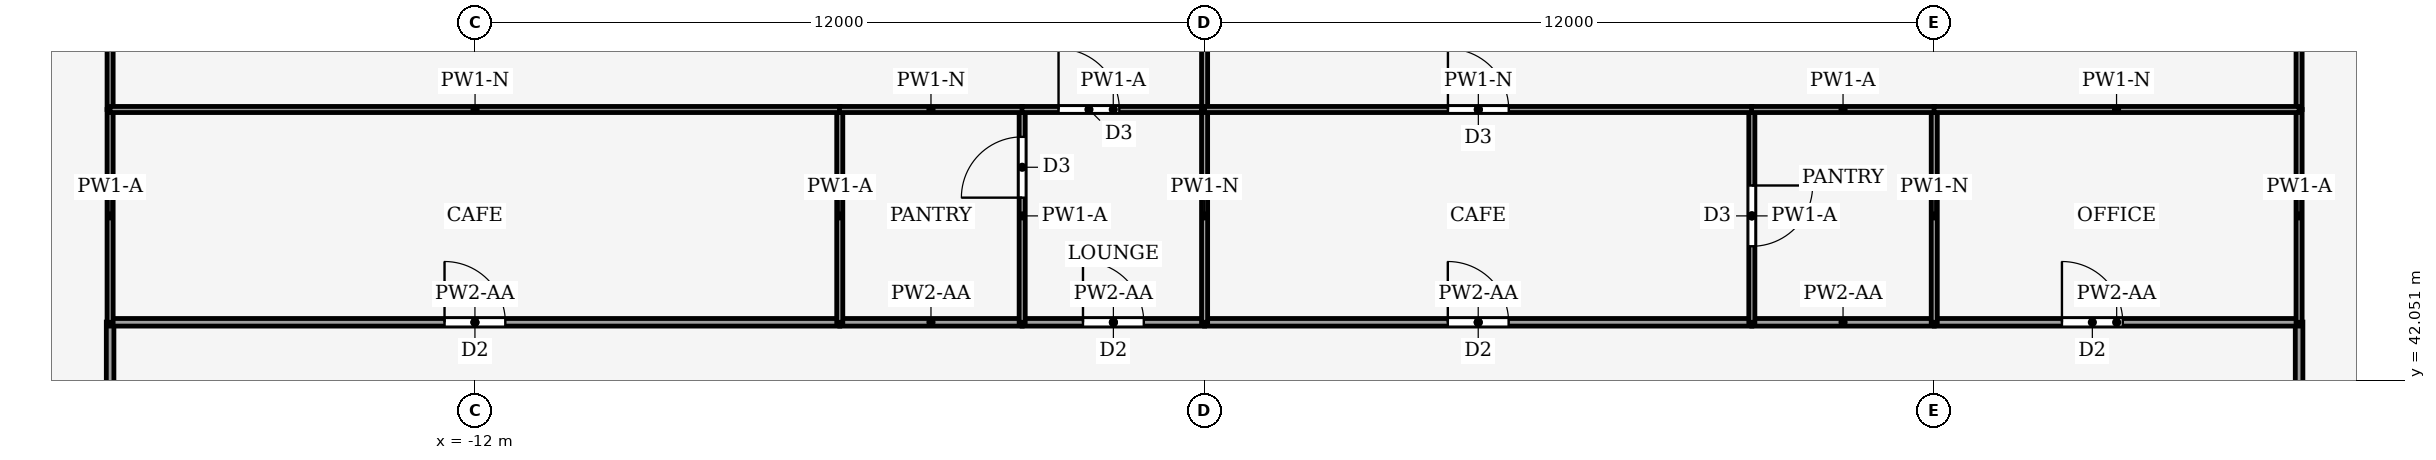
"""IFC4 building model, lengths in metres.
Left out: names, types, materials, properties, quantities, classifications, styles, units other than length and angle.
Written with IfcOpenShell. Run it as: python <this file> out.ifc"""

import sys

from ifc_helpers import new_model, si_unit, direction, frame, frame_2d, origin, place, context, subcontext, project, spatial, rectangle, extrude, element, fill, save


model = new_model("IFC4")
c1 = context("Model", 3, precision=1e-05, world=origin(), true_north=direction((0.0, 1.0)))
c2 = subcontext(c1, "Body", "Model", "MODEL_VIEW")
j1 = project(units=[si_unit("LENGTHUNIT", "METRE"), si_unit("PLANEANGLEUNIT", "RADIAN")], contexts=[c1])
p1 = place(None, origin())
s1 = spatial("IfcSite", under=j1, at=p1, CompositionType="ELEMENT")
p2 = place(p1, origin())
s2 = spatial("IfcBuilding", under=s1, at=p2, CompositionType="ELEMENT")
p3 = place(p2, frame((0.0, 0.0, 289.0)))
s3 = spatial("IfcBuildingStorey", under=s2, at=p3, CompositionType="ELEMENT", Elevation=289.0)
p4 = place(p3, frame((-18.0, 43.004, 0.0), z_axis=(0.0, 0.0, 1.0), x_axis=(0.0, -1.0, 0.0)))
e1 = element("IfcWall", 1, at=p4, inside=s3, PredefinedType="PARTITIONING", context=c2, shape_type="SweptSolid", body=[
    extrude(rectangle(XDim=11.504, YDim=0.125, at=frame_2d((5.752, 0.0))), origin(), (0.0, 0.0, 1.0), 4.14),
])
p5 = place(p4, frame((4.852, 0.0, 0.0)))
e2 = element("IfcOpeningElement", 2, at=p5, cuts=e1, PredefinedType="OPENING", context=c2, shape_type="SweptSolid", body=[
    extrude(rectangle(XDim=1.8, YDim=2.1, at=frame_2d((0.9, 1.05))), frame((0.0, 0.073, 0.0), z_axis=(0.0, -1.0, 0.0), x_axis=(1.0, 0.0, 0.0)), (0.0, 0.0, 1.0), 0.145),
])
p6 = place(p3, frame((18.0, 43.004, 0.0), z_axis=(0.0, 0.0, 1.0), x_axis=(0.0, -1.0, 0.0)))
e3 = element("IfcWall", 3, at=p6, inside=s3, PredefinedType="PARTITIONING", context=c2, shape_type="SweptSolid", body=[
    extrude(rectangle(XDim=5.504, YDim=0.125, at=frame_2d((2.752, 0.0))), origin(), (0.0, 0.0, 1.0), 4.14),
])
p7 = place(p6, frame((4.252, 0.0, 0.0)))
e4 = element("IfcOpeningElement", 4, at=p7, cuts=e3, PredefinedType="OPENING", context=c2, shape_type="SweptSolid", body=[
    extrude(rectangle(XDim=1.0, YDim=2.1, at=frame_2d((0.5, 1.05))), frame((0.0, 0.073, 0.0), z_axis=(0.0, -1.0, 0.0), x_axis=(1.0, 0.0, 0.0)), (0.0, 0.0, 1.0), 0.145),
])
p8 = place(p3, frame((-18.0, 43.0, 0.0), z_axis=(0.0, 0.0, 1.0), x_axis=(1.0, 0.0, 0.0)))
e5 = element("IfcWall", 5, at=p8, inside=s3, PredefinedType="PARTITIONING", context=c2, shape_type="SweptSolid", body=[
    extrude(rectangle(XDim=12.0, YDim=0.125, at=frame_2d((6.0, 0.0))), origin(), (0.0, 0.0, 1.0), 4.39),
])
p9 = place(p8, frame((5.5, 0.0, 0.0)))
e6 = element("IfcOpeningElement", 6, at=p9, cuts=e5, PredefinedType="OPENING", context=c2, shape_type="SweptSolid", body=[
    extrude(rectangle(XDim=1.0, YDim=2.1, at=frame_2d((0.5, 1.05))), frame((0.0, 0.073, 0.0), z_axis=(0.0, -1.0, 0.0), x_axis=(1.0, 0.0, 0.0)), (0.0, 0.0, 1.0), 0.145),
])
p10 = place(p3, frame((-3.0, 43.0, 0.0), z_axis=(0.0, 0.0, 1.0), x_axis=(-1.0, 0.0, 0.0)))
e7 = element("IfcWall", 7, at=p10, inside=s3, PredefinedType="PARTITIONING", context=c2, shape_type="SweptSolid", body=[
    extrude(rectangle(XDim=3.0, YDim=0.125, at=frame_2d((1.5, 0.0))), origin(), (0.0, 0.0, 1.0), 4.39),
])
p11 = place(p3, frame((-3.0, 43.0, 0.0), z_axis=(0.0, 0.0, 1.0), x_axis=(1.0, 0.0, 0.0)))
e8 = element("IfcWall", 8, at=p11, inside=s3, PredefinedType="PARTITIONING", context=c2, shape_type="SweptSolid", body=[
    extrude(rectangle(XDim=3.0, YDim=0.125, at=frame_2d((1.5, 0.0))), origin(), (0.0, 0.0, 1.0), 4.39),
])
p12 = place(p11, frame((1.0, 0.0, 0.0)))
e9 = element("IfcOpeningElement", 9, at=p12, cuts=e8, PredefinedType="OPENING", context=c2, shape_type="SweptSolid", body=[
    extrude(rectangle(XDim=1.0, YDim=2.1, at=frame_2d((0.5, 1.05))), frame((0.0, 0.073, 0.0), z_axis=(0.0, -1.0, 0.0), x_axis=(1.0, 0.0, 0.0)), (0.0, 0.0, 1.0), 0.145),
])
p13 = place(p3, frame((0.0, 43.0, 0.0), z_axis=(0.0, 0.0, 1.0), x_axis=(1.0, 0.0, 0.0)))
e10 = element("IfcWall", 10, at=p13, inside=s3, PredefinedType="PARTITIONING", context=c2, shape_type="SweptSolid", body=[
    extrude(rectangle(XDim=9.0, YDim=0.125, at=frame_2d((4.5, 0.0))), origin(), (0.0, 0.0, 1.0), 4.39),
])
p14 = place(p13, frame((4.0, 0.0, 0.0)))
e11 = element("IfcOpeningElement", 11, at=p14, cuts=e10, PredefinedType="OPENING", context=c2, shape_type="SweptSolid", body=[
    extrude(rectangle(XDim=1.0, YDim=2.1, at=frame_2d((0.5, 1.05))), frame((0.0, 0.073, 0.0), z_axis=(0.0, -1.0, 0.0), x_axis=(1.0, 0.0, 0.0)), (0.0, 0.0, 1.0), 0.145),
])
p15 = place(p3, frame((12.0, 43.0, 0.0), z_axis=(0.0, 0.0, 1.0), x_axis=(-1.0, 0.0, 0.0)))
e12 = element("IfcWall", 12, at=p15, inside=s3, PredefinedType="PARTITIONING", context=c2, shape_type="SweptSolid", body=[
    extrude(rectangle(XDim=3.0, YDim=0.125, at=frame_2d((1.5, 0.0))), origin(), (0.0, 0.0, 1.0), 4.39),
])
p16 = place(p3, frame((12.0, 43.0, 0.0), z_axis=(0.0, 0.0, 1.0), x_axis=(1.0, 0.0, 0.0)))
e13 = element("IfcWall", 13, at=p16, inside=s3, PredefinedType="PARTITIONING", context=c2, shape_type="SweptSolid", body=[
    extrude(rectangle(XDim=6.0, YDim=0.125, at=frame_2d((3.0, 0.0))), origin(), (0.0, 0.0, 1.0), 4.39),
])
p17 = place(p16, frame((2.1, 0.0, 0.0)))
e14 = element("IfcOpeningElement", 14, at=p17, cuts=e13, PredefinedType="OPENING", context=c2, shape_type="SweptSolid", body=[
    extrude(rectangle(XDim=1.0, YDim=2.1, at=frame_2d((0.5, 1.05))), frame((0.0, 0.073, 0.0), z_axis=(0.0, -1.0, 0.0), x_axis=(1.0, 0.0, 0.0)), (0.0, 0.0, 1.0), 0.145),
])
p18 = place(p3, frame((-18.0, 43.0, 0.0), z_axis=(0.0, 0.0, 1.0), x_axis=(0.0, 1.0, 0.0)))
e15 = element("IfcWall", 15, at=p18, inside=s3, PredefinedType="PARTITIONING", context=c2, shape_type="SweptSolid", body=[
    extrude(rectangle(XDim=3.5, YDim=0.1, at=frame_2d((1.75, 0.0))), origin(), (0.0, 0.0, 1.0), 4.87),
])
p19 = place(p3, frame((-18.0, 46.5, 0.0), z_axis=(0.0, 0.0, 1.0), x_axis=(0.0, 1.0, 0.0)))
e16 = element("IfcWall", 16, at=p19, inside=s3, PredefinedType="PARTITIONING", context=c2, shape_type="SweptSolid", body=[
    extrude(rectangle(XDim=18.0, YDim=0.1, at=frame_2d((9.0, 0.0))), origin(), (0.0, 0.0, 1.0), 4.35),
])
p20 = place(p3, frame((18.0, 46.5, 0.0), z_axis=(0.0, 0.0, 1.0), x_axis=(0.0, -1.0, 0.0)))
e17 = element("IfcWall", 17, at=p20, inside=s3, PredefinedType="PARTITIONING", context=c2, shape_type="SweptSolid", body=[
    extrude(rectangle(XDim=3.5, YDim=0.1, at=frame_2d((1.75, 0.0))), origin(), (0.0, 0.0, 1.0), 4.87),
])
p21 = place(p3, frame((18.0, 61.5, 0.0), z_axis=(0.0, 0.0, 1.0), x_axis=(0.0, -1.0, 0.0)))
e18 = element("IfcWall", 18, at=p21, inside=s3, PredefinedType="PARTITIONING", context=c2, shape_type="SweptSolid", body=[
    extrude(rectangle(XDim=15.0, YDim=0.1, at=frame_2d((7.5, 0.0))), origin(), (0.0, 0.0, 1.0), 4.35),
])
p22 = place(p3, frame((-6.0, 43.0, 0.0), z_axis=(0.0, 0.0, 1.0), x_axis=(0.0, 1.0, 0.0)))
e19 = element("IfcWall", 19, at=p22, inside=s3, PredefinedType="PARTITIONING", context=c2, shape_type="SweptSolid", body=[
    extrude(rectangle(XDim=3.5, YDim=0.1, at=frame_2d((1.75, 0.0))), origin(), (0.0, 0.0, 1.0), 4.87),
])
p23 = place(p3, frame((-5.996, 46.5, 0.0), z_axis=(0.0, 0.0, 1.0), x_axis=(-1.0, 0.0, 0.0)))
e20 = element("IfcWall", 20, at=p23, inside=s3, PredefinedType="PARTITIONING", context=c2, shape_type="SweptSolid", body=[
    extrude(rectangle(XDim=12.004, YDim=0.1, at=frame_2d((6.002, 0.0))), origin(), (0.0, 0.0, 1.0), 4.39),
])
p24 = place(p3, frame((-3.0, 43.0, 0.0), z_axis=(0.0, 0.0, 1.0), x_axis=(0.0, 1.0, 0.0)))
e21 = element("IfcWall", 21, at=p24, inside=s3, PredefinedType="PARTITIONING", context=c2, shape_type="SweptSolid", body=[
    extrude(rectangle(XDim=3.5, YDim=0.1, at=frame_2d((1.75, 0.0))), origin(), (0.0, 0.0, 1.0), 4.87),
])
p25 = place(p24, frame((2.05, 0.0, 0.0)))
e22 = element("IfcOpeningElement", 22, at=p25, cuts=e21, PredefinedType="OPENING", context=c2, shape_type="SweptSolid", body=[
    extrude(rectangle(XDim=1.0, YDim=2.1, at=frame_2d((0.5, 1.05))), frame((0.0, 0.06, 0.0), z_axis=(0.0, -1.0, 0.0), x_axis=(1.0, 0.0, 0.0)), (0.0, 0.0, 1.0), 0.12),
])
p26 = place(p3, frame((-2.996, 46.5, 0.0), z_axis=(0.0, 0.0, 1.0), x_axis=(-1.0, 0.0, 0.0)))
e23 = element("IfcWall", 23, at=p26, inside=s3, PredefinedType="PARTITIONING", context=c2, shape_type="SweptSolid", body=[
    extrude(rectangle(XDim=3.008, YDim=0.1, at=frame_2d((1.504, 0.0))), origin(), (0.0, 0.0, 1.0), 4.39),
])
p27 = place(p3, frame((-3.004, 46.5, 0.0), z_axis=(0.0, 0.0, 1.0), x_axis=(1.0, 0.0, 0.0)))
e24 = element("IfcWall", 24, at=p27, inside=s3, PredefinedType="PARTITIONING", context=c2, shape_type="SweptSolid", body=[
    extrude(rectangle(XDim=3.004, YDim=0.1, at=frame_2d((1.502, 0.0))), origin(), (0.0, 0.0, 1.0), 4.87),
])
p28 = place(p27, frame((0.602, 0.0, 0.0)))
e25 = element("IfcOpeningElement", 25, at=p28, cuts=e24, PredefinedType="OPENING", context=c2, shape_type="SweptSolid", body=[
    extrude(rectangle(XDim=1.0, YDim=2.1, at=frame_2d((0.5, 1.05))), frame((0.0, 0.06, 0.0), z_axis=(0.0, -1.0, 0.0), x_axis=(1.0, 0.0, 0.0)), (0.0, 0.0, 1.0), 0.12),
])
p29 = place(p3, frame((0.0, 43.0, 0.0), z_axis=(0.0, 0.0, 1.0), x_axis=(0.0, 1.0, 0.0)))
e26 = element("IfcWall", 26, at=p29, inside=s3, PredefinedType="PARTITIONING", context=c2, shape_type="SweptSolid", body=[
    extrude(rectangle(XDim=3.5, YDim=0.1, at=frame_2d((1.75, 0.0))), origin(), (0.0, 0.0, 1.0), 4.39),
])
p30 = place(p3, frame((0.0, 46.5, 0.0), z_axis=(0.0, 0.0, 1.0), x_axis=(0.0, 1.0, 0.0)))
e27 = element("IfcWall", 27, at=p30, inside=s3, PredefinedType="PARTITIONING", context=c2, shape_type="SweptSolid", body=[
    extrude(rectangle(XDim=15.0, YDim=0.1, at=frame_2d((7.5, 0.0))), origin(), (0.0, 0.0, 1.0), 4.29),
])
p31 = place(p3, frame((9.0, 46.5, 0.0), z_axis=(0.0, 0.0, 1.0), x_axis=(0.0, -1.0, 0.0)))
e28 = element("IfcWall", 28, at=p31, inside=s3, PredefinedType="PARTITIONING", context=c2, shape_type="SweptSolid", body=[
    extrude(rectangle(XDim=3.5, YDim=0.1, at=frame_2d((1.75, 0.0))), origin(), (0.0, 0.0, 1.0), 4.87),
])
p32 = place(p31, frame((1.25, 0.0, 0.0)))
e29 = element("IfcOpeningElement", 29, at=p32, cuts=e28, PredefinedType="OPENING", context=c2, shape_type="SweptSolid", body=[
    extrude(rectangle(XDim=1.0, YDim=2.1, at=frame_2d((0.5, 1.05))), frame((0.0, 0.06, 0.0), z_axis=(0.0, -1.0, 0.0), x_axis=(1.0, 0.0, 0.0)), (0.0, 0.0, 1.0), 0.12),
])
p33 = place(p3, frame((0.0, 46.5, 0.0), z_axis=(0.0, 0.0, 1.0), x_axis=(1.0, 0.0, 0.0)))
e30 = element("IfcWall", 30, at=p33, inside=s3, PredefinedType="PARTITIONING", context=c2, shape_type="SweptSolid", body=[
    extrude(rectangle(XDim=9.004, YDim=0.1, at=frame_2d((4.502, 0.0))), origin(), (0.0, 0.0, 1.0), 4.39),
])
p34 = place(p33, frame((4.002, 0.0, 0.0)))
e31 = element("IfcOpeningElement", 31, at=p34, cuts=e30, PredefinedType="OPENING", context=c2, shape_type="SweptSolid", body=[
    extrude(rectangle(XDim=1.0, YDim=2.1, at=frame_2d((0.5, 1.05))), frame((0.0, 0.06, 0.0), z_axis=(0.0, -1.0, 0.0), x_axis=(1.0, 0.0, 0.0)), (0.0, 0.0, 1.0), 0.12),
])
p35 = place(p3, frame((12.0, 43.0, 0.0), z_axis=(0.0, 0.0, 1.0), x_axis=(0.0, 1.0, 0.0)))
e32 = element("IfcWall", 32, at=p35, inside=s3, PredefinedType="PARTITIONING", context=c2, shape_type="SweptSolid", body=[
    extrude(rectangle(XDim=3.5, YDim=0.1, at=frame_2d((1.75, 0.0))), origin(), (0.0, 0.0, 1.0), 4.39),
])
p36 = place(p3, frame((12.004, 46.5, 0.0), z_axis=(0.0, 0.0, 1.0), x_axis=(-1.0, 0.0, 0.0)))
e33 = element("IfcWall", 33, at=p36, inside=s3, PredefinedType="PARTITIONING", context=c2, shape_type="SweptSolid", body=[
    extrude(rectangle(XDim=3.008, YDim=0.1, at=frame_2d((1.504, 0.0))), origin(), (0.0, 0.0, 1.0), 4.87),
])
p37 = place(p3, frame((18.0, 46.5, 0.0), z_axis=(0.0, 0.0, 1.0), x_axis=(-1.0, 0.0, 0.0)))
e34 = element("IfcWall", 34, at=p37, inside=s3, PredefinedType="PARTITIONING", context=c2, shape_type="SweptSolid", body=[
    extrude(rectangle(XDim=6.004, YDim=0.1, at=frame_2d((3.002, 0.0))), origin(), (0.0, 0.0, 1.0), 4.39),
])
p38 = place(p9, origin())
e35 = element("IfcDoor", 35, at=p38, inside=s3, OperationType="SINGLE_SWING_LEFT", PredefinedType="DOOR", context=c2, shape_type="SweptSolid", body=[
    extrude(rectangle(XDim=1.0, YDim=2.1, at=frame_2d((0.5, 1.05))), frame((0.0, 0.025, 0.0), z_axis=(0.0, -1.0, 0.0), x_axis=(1.0, 0.0, 0.0)), (0.0, 0.0, 1.0), 0.05),
])
fill(e6, e35)
p39 = place(p12, origin())
e36 = element("IfcDoor", 36, at=p39, inside=s3, OperationType="SINGLE_SWING_RIGHT", PredefinedType="DOOR", context=c2, shape_type="SweptSolid", body=[
    extrude(rectangle(XDim=1.0, YDim=2.1, at=frame_2d((0.5, 1.05))), frame((0.0, 0.025, 0.0), z_axis=(0.0, -1.0, 0.0), x_axis=(1.0, 0.0, 0.0)), (0.0, 0.0, 1.0), 0.05),
])
fill(e9, e36)
p40 = place(p14, origin())
e37 = element("IfcDoor", 37, at=p40, inside=s3, OperationType="SINGLE_SWING_LEFT", PredefinedType="DOOR", context=c2, shape_type="SweptSolid", body=[
    extrude(rectangle(XDim=1.0, YDim=2.1, at=frame_2d((0.5, 1.05))), frame((0.0, 0.025, 0.0), z_axis=(0.0, -1.0, 0.0), x_axis=(1.0, 0.0, 0.0)), (0.0, 0.0, 1.0), 0.05),
])
fill(e11, e37)
p41 = place(p17, origin())
e38 = element("IfcDoor", 38, at=p41, inside=s3, OperationType="SINGLE_SWING_LEFT", PredefinedType="DOOR", context=c2, shape_type="SweptSolid", body=[
    extrude(rectangle(XDim=1.0, YDim=2.1, at=frame_2d((0.5, 1.05))), frame((0.0, 0.025, 0.0), z_axis=(0.0, -1.0, 0.0), x_axis=(1.0, 0.0, 0.0)), (0.0, 0.0, 1.0), 0.05),
])
fill(e14, e38)
p42 = place(p25, origin())
e39 = element("IfcDoor", 39, at=p42, inside=s3, OperationType="SINGLE_SWING_RIGHT", PredefinedType="DOOR", context=c2, shape_type="SweptSolid", body=[
    extrude(rectangle(XDim=1.0, YDim=2.1, at=frame_2d((0.5, 1.05))), frame((0.0, 0.025, 0.0), z_axis=(0.0, -1.0, 0.0), x_axis=(1.0, 0.0, 0.0)), (0.0, 0.0, 1.0), 0.05),
])
fill(e22, e39)
p43 = place(p28, origin())
e40 = element("IfcDoor", 40, at=p43, inside=s3, OperationType="SINGLE_SWING_LEFT", PredefinedType="DOOR", context=c2, shape_type="SweptSolid", body=[
    extrude(rectangle(XDim=1.0, YDim=2.1, at=frame_2d((0.5, 1.05))), frame((0.0, 0.025, 0.0), z_axis=(0.0, -1.0, 0.0), x_axis=(1.0, 0.0, 0.0)), (0.0, 0.0, 1.0), 0.05),
])
fill(e25, e40)
p44 = place(p32, origin())
e41 = element("IfcDoor", 41, at=p44, inside=s3, OperationType="SINGLE_SWING_RIGHT", PredefinedType="DOOR", context=c2, shape_type="SweptSolid", body=[
    extrude(rectangle(XDim=1.0, YDim=2.1, at=frame_2d((0.5, 1.05))), frame((0.0, 0.025, 0.0), z_axis=(0.0, -1.0, 0.0), x_axis=(1.0, 0.0, 0.0)), (0.0, 0.0, 1.0), 0.05),
])
fill(e29, e41)
p45 = place(p34, origin())
e42 = element("IfcDoor", 42, at=p45, inside=s3, OperationType="SINGLE_SWING_LEFT", PredefinedType="DOOR", context=c2, shape_type="SweptSolid", body=[
    extrude(rectangle(XDim=1.0, YDim=2.1, at=frame_2d((0.5, 1.05))), frame((0.0, 0.025, 0.0), z_axis=(0.0, -1.0, 0.0), x_axis=(1.0, 0.0, 0.0)), (0.0, 0.0, 1.0), 0.05),
])
fill(e31, e42)
save(model, sys.argv[1])
